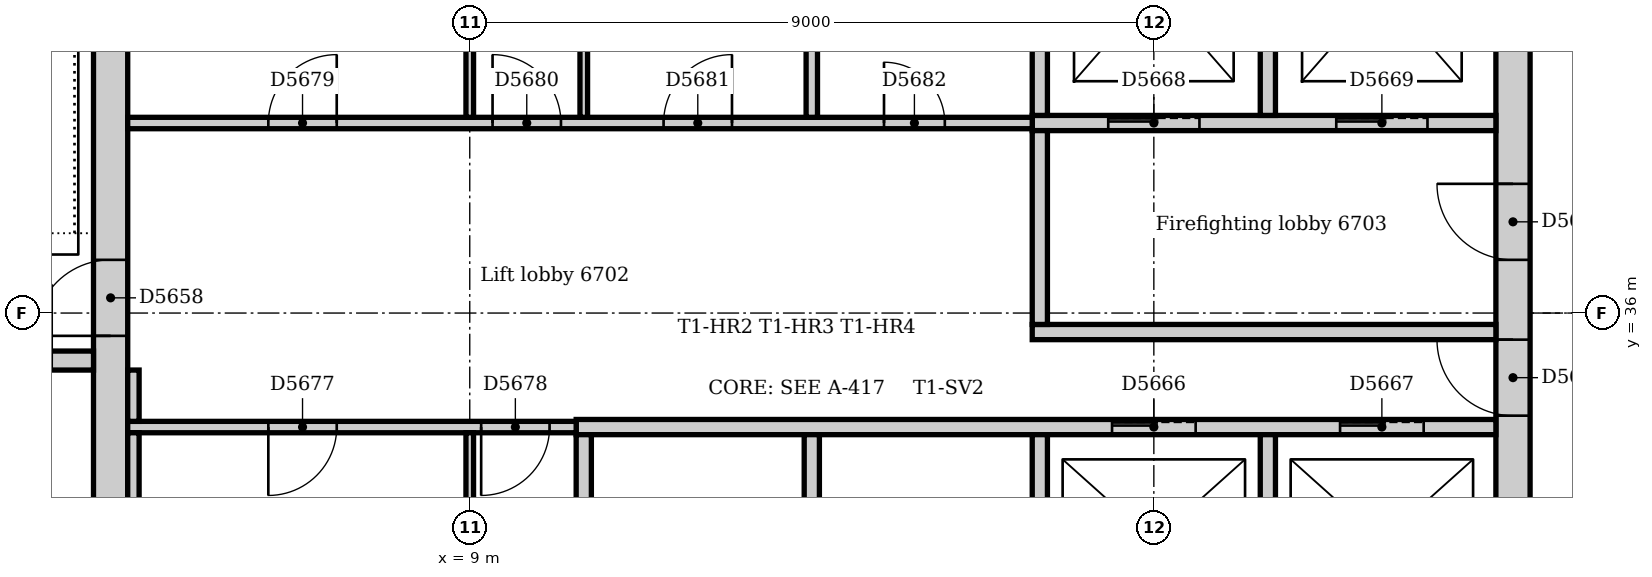
"""IFC4 building model, lengths in metres.
Left out: names, types, materials, properties, quantities, classifications, styles, units other than length and angle.
Written with IfcOpenShell. Run it as: python <this file> out.ifc"""

import sys

from ifc_helpers import new_model, si_unit, direction, frame, frame_2d, origin, place, context, subcontext, project, spatial, rectangle, extrude, element, fill, save


model = new_model("IFC4")
c1 = context("Model", 3, precision=1e-05, world=origin(), true_north=direction((0.0, 1.0)))
c2 = subcontext(c1, "Body", "Model", "MODEL_VIEW")
j1 = project(units=[si_unit("LENGTHUNIT", "METRE"), si_unit("PLANEANGLEUNIT", "RADIAN")], contexts=[c1])
p1 = place(None, origin())
s1 = spatial("IfcSite", under=j1, at=p1, CompositionType="ELEMENT")
p2 = place(p1, origin())
s2 = spatial("IfcBuilding", under=s1, at=p2, CompositionType="ELEMENT")
p3 = place(p2, frame((0.0, 0.0, 279.0)))
s3 = spatial("IfcBuildingStorey", under=s2, at=p3, CompositionType="ELEMENT", Elevation=279.0)
p4 = place(p3, frame((22.725, 31.5, 0.0), z_axis=(0.0, 0.0, 1.0), x_axis=(0.0, 1.0, 0.0)))
e1 = element("IfcWall", 1, at=p4, inside=s3, PredefinedType="SOLIDWALL", context=c2, shape_type="SweptSolid", body=[
    extrude(rectangle(XDim=10.5, YDim=0.45, at=frame_2d((5.25, 0.0))), origin(), (0.0, 0.0, 1.0), 4.0),
])
p5 = place(p4, frame((3.15, 0.0, 0.0)))
e2 = element("IfcOpeningElement", 2, at=p5, cuts=e1, PredefinedType="OPENING", context=c2, shape_type="SweptSolid", body=[
    extrude(rectangle(XDim=1.0, YDim=2.1, at=frame_2d((0.5, 1.05))), frame((0.0, 0.235, 0.0), z_axis=(0.0, -1.0, 0.0), x_axis=(1.0, 0.0, 0.0)), (0.0, 0.0, 1.0), 0.47),
])
p6 = place(p4, frame((5.2, 0.0, 0.0)))
e3 = element("IfcOpeningElement", 3, at=p6, cuts=e1, PredefinedType="OPENING", context=c2, shape_type="SweptSolid", body=[
    extrude(rectangle(XDim=1.0, YDim=2.1, at=frame_2d((0.5, 1.05))), frame((0.0, 0.235, 0.0), z_axis=(0.0, -1.0, 0.0), x_axis=(1.0, 0.0, 0.0)), (0.0, 0.0, 1.0), 0.47),
])
p7 = place(p3, frame((4.275, 42.0, 0.0), z_axis=(0.0, 0.0, 1.0), x_axis=(0.0, -1.0, 0.0)))
e4 = element("IfcWall", 4, at=p7, inside=s3, PredefinedType="SOLIDWALL", context=c2, shape_type="SweptSolid", body=[
    extrude(rectangle(XDim=10.5, YDim=0.45, at=frame_2d((5.25, 0.0))), origin(), (0.0, 0.0, 1.0), 4.0),
])
p8 = place(p7, frame((5.3, 0.0, 0.0)))
e5 = element("IfcOpeningElement", 5, at=p8, cuts=e4, PredefinedType="OPENING", context=c2, shape_type="SweptSolid", body=[
    extrude(rectangle(XDim=1.0, YDim=2.1, at=frame_2d((0.5, 1.05))), frame((0.0, 0.235, 0.0), z_axis=(0.0, -1.0, 0.0), x_axis=(1.0, 0.0, 0.0)), (0.0, 0.0, 1.0), 0.47),
])
p9 = place(p3, frame((0.36, 35.375, 0.0), z_axis=(0.0, 0.0, 1.0), x_axis=(1.0, 0.0, 0.0)))
e6 = element("IfcWall", 6, at=p9, inside=s3, PredefinedType="SOLIDWALL", context=c2, shape_type="SweptSolid", body=[
    extrude(rectangle(XDim=3.69, YDim=0.25, at=frame_2d((1.845, 0.0))), origin(), (0.0, 0.0, 1.0), 4.0),
])
p10 = place(p9, frame((2.14, 0.0, 0.0)))
e7 = element("IfcOpeningElement", 7, at=p10, cuts=e6, PredefinedType="OPENING", context=c2, shape_type="SweptSolid", body=[
    extrude(rectangle(XDim=1.0, YDim=2.1, at=frame_2d((0.5, 1.05))), frame((0.0, 0.135, 0.0), z_axis=(0.0, -1.0, 0.0), x_axis=(1.0, 0.0, 0.0)), (0.0, 0.0, 1.0), 0.27),
])
p11 = place(p3, frame((16.4, 35.75, 0.0), z_axis=(0.0, 0.0, 1.0), x_axis=(1.0, 0.0, 0.0)))
e8 = element("IfcWall", 8, at=p11, inside=s3, PredefinedType="PARTITIONING", context=c2, shape_type="SweptSolid", body=[
    extrude(rectangle(XDim=6.1, YDim=0.2, at=frame_2d((3.05, 0.0))), origin(), (0.0, 0.0, 1.0), 3.8),
])
p12 = place(p3, frame((16.4, 38.5, 0.0), z_axis=(0.0, 0.0, 1.0), x_axis=(1.0, 0.0, 0.0)))
e9 = element("IfcWall", 9, at=p12, inside=s3, PredefinedType="PARTITIONING", context=c2, shape_type="SweptSolid", body=[
    extrude(rectangle(XDim=6.1, YDim=0.2, at=frame_2d((3.05, 0.0))), origin(), (0.0, 0.0, 1.0), 3.8),
])
p13 = place(p12, frame((1.0, 0.0, 0.0)))
e10 = element("IfcOpeningElement", 10, at=p13, cuts=e9, PredefinedType="OPENING", context=c2, shape_type="SweptSolid", body=[
    extrude(rectangle(XDim=1.2, YDim=2.1, at=frame_2d((0.6, 1.05))), frame((0.0, 0.11, 0.0), z_axis=(0.0, -1.0, 0.0), x_axis=(1.0, 0.0, 0.0)), (0.0, 0.0, 1.0), 0.22),
])
p14 = place(p12, frame((4.0, 0.0, 0.0)))
e11 = element("IfcOpeningElement", 11, at=p14, cuts=e9, PredefinedType="OPENING", context=c2, shape_type="SweptSolid", body=[
    extrude(rectangle(XDim=1.2, YDim=2.1, at=frame_2d((0.6, 1.05))), frame((0.0, 0.11, 0.0), z_axis=(0.0, -1.0, 0.0), x_axis=(1.0, 0.0, 0.0)), (0.0, 0.0, 1.0), 0.22),
])
p15 = place(p3, frame((16.5, 35.85, 0.0), z_axis=(0.0, 0.0, 1.0), x_axis=(0.0, 1.0, 0.0)))
e12 = element("IfcWall", 12, at=p15, inside=s3, PredefinedType="PARTITIONING", context=c2, shape_type="SweptSolid", body=[
    extrude(rectangle(XDim=2.55, YDim=0.2, at=frame_2d((1.275, 0.0))), origin(), (0.0, 0.0, 1.0), 3.8),
])
p16 = place(p3, frame((10.4, 34.5, 0.0), z_axis=(0.0, 0.0, 1.0), x_axis=(1.0, 0.0, 0.0)))
e13 = element("IfcWall", 13, at=p16, inside=s3, PredefinedType="PARTITIONING", context=c2, shape_type="SweptSolid", body=[
    extrude(rectangle(XDim=12.1, YDim=0.2, at=frame_2d((6.05, 0.0))), origin(), (0.0, 0.0, 1.0), 3.8),
])
p17 = place(p16, frame((7.05, 0.0, 0.0)))
e14 = element("IfcOpeningElement", 14, at=p17, cuts=e13, PredefinedType="OPENING", context=c2, shape_type="SweptSolid", body=[
    extrude(rectangle(XDim=1.1, YDim=2.1, at=frame_2d((0.55, 1.05))), frame((0.0, 0.11, 0.0), z_axis=(0.0, -1.0, 0.0), x_axis=(1.0, 0.0, 0.0)), (0.0, 0.0, 1.0), 0.22),
])
p18 = place(p16, frame((10.05, 0.0, 0.0)))
e15 = element("IfcOpeningElement", 15, at=p18, cuts=e13, PredefinedType="OPENING", context=c2, shape_type="SweptSolid", body=[
    extrude(rectangle(XDim=1.1, YDim=2.1, at=frame_2d((0.55, 1.05))), frame((0.0, 0.11, 0.0), z_axis=(0.0, -1.0, 0.0), x_axis=(1.0, 0.0, 0.0)), (0.0, 0.0, 1.0), 0.22),
])
for number, where, z_axis, x_axis in (
    (16, (10.5, 31.75, 0.0), (0.0, 0.0, 1.0), (0.0, 1.0, 0.0)),
    (17, (13.5, 31.75, 0.0), (0.0, 0.0, 1.0), (0.0, 1.0, 0.0)),
    (18, (16.5, 31.75, 0.0), (0.0, 0.0, 1.0), (0.0, 1.0, 0.0)),
    (19, (19.5, 31.75, 0.0), (0.0, 0.0, 1.0), (0.0, 1.0, 0.0)),
):
    element("IfcWall", number, at=place(p3, frame(where, z_axis=z_axis, x_axis=x_axis)), inside=s3, PredefinedType="PARTITIONING", context=c2, shape_type="SweptSolid", body=[
        extrude(rectangle(XDim=2.65, YDim=0.2, at=frame_2d((1.325, 0.0))), origin(), (0.0, 0.0, 1.0), 3.8),
    ])
for number, where, z_axis, x_axis in (
    (20, (16.5, 38.6, 0.0), (0.0, 0.0, 1.0), (0.0, 1.0, 0.0)),
    (21, (19.5, 38.6, 0.0), (0.0, 0.0, 1.0), (0.0, 1.0, 0.0)),
):
    element("IfcWall", number, at=place(p3, frame(where, z_axis=z_axis, x_axis=x_axis)), inside=s3, PredefinedType="PARTITIONING", context=c2, shape_type="SweptSolid", body=[
        extrude(rectangle(XDim=3.4, YDim=0.2, at=frame_2d((1.7, 0.0))), origin(), (0.0, 0.0, 1.0), 3.8),
    ])
p19 = place(p3, frame((4.5, 38.5, 0.0), z_axis=(0.0, 0.0, 1.0), x_axis=(1.0, 0.0, 0.0)))
e22 = element("IfcWall", 22, at=p19, inside=s3, PredefinedType="PARTITIONING", context=c2, shape_type="SweptSolid", body=[
    extrude(rectangle(XDim=11.9, YDim=0.15, at=frame_2d((5.95, 0.0))), origin(), (0.0, 0.0, 1.0), 3.8),
])
p20 = place(p19, frame((1.85, 0.0, 0.0)))
e23 = element("IfcOpeningElement", 23, at=p20, cuts=e22, PredefinedType="OPENING", context=c2, shape_type="SweptSolid", body=[
    extrude(rectangle(XDim=0.9, YDim=2.1, at=frame_2d((0.45, 1.05))), frame((0.0, 0.085, 0.0), z_axis=(0.0, -1.0, 0.0), x_axis=(1.0, 0.0, 0.0)), (0.0, 0.0, 1.0), 0.17),
])
p21 = place(p19, frame((4.8, 0.0, 0.0)))
e24 = element("IfcOpeningElement", 24, at=p21, cuts=e22, PredefinedType="OPENING", context=c2, shape_type="SweptSolid", body=[
    extrude(rectangle(XDim=0.9, YDim=2.1, at=frame_2d((0.45, 1.05))), frame((0.0, 0.085, 0.0), z_axis=(0.0, -1.0, 0.0), x_axis=(1.0, 0.0, 0.0)), (0.0, 0.0, 1.0), 0.17),
])
p22 = place(p19, frame((7.05, 0.0, 0.0)))
e25 = element("IfcOpeningElement", 25, at=p22, cuts=e22, PredefinedType="OPENING", context=c2, shape_type="SweptSolid", body=[
    extrude(rectangle(XDim=0.9, YDim=2.1, at=frame_2d((0.45, 1.05))), frame((0.0, 0.085, 0.0), z_axis=(0.0, -1.0, 0.0), x_axis=(1.0, 0.0, 0.0)), (0.0, 0.0, 1.0), 0.17),
])
p23 = place(p19, frame((9.95, 0.0, 0.0)))
e26 = element("IfcOpeningElement", 26, at=p23, cuts=e22, PredefinedType="OPENING", context=c2, shape_type="SweptSolid", body=[
    extrude(rectangle(XDim=0.8, YDim=2.1, at=frame_2d((0.4, 1.05))), frame((0.0, 0.085, 0.0), z_axis=(0.0, -1.0, 0.0), x_axis=(1.0, 0.0, 0.0)), (0.0, 0.0, 1.0), 0.17),
])
p24 = place(p3, frame((4.5, 34.5, 0.0), z_axis=(0.0, 0.0, 1.0), x_axis=(1.0, 0.0, 0.0)))
e27 = element("IfcWall", 27, at=p24, inside=s3, PredefinedType="PARTITIONING", context=c2, shape_type="SweptSolid", body=[
    extrude(rectangle(XDim=5.9, YDim=0.15, at=frame_2d((2.95, 0.0))), origin(), (0.0, 0.0, 1.0), 3.8),
])
p25 = place(p24, frame((1.85, 0.0, 0.0)))
e28 = element("IfcOpeningElement", 28, at=p25, cuts=e27, PredefinedType="OPENING", context=c2, shape_type="SweptSolid", body=[
    extrude(rectangle(XDim=0.9, YDim=2.1, at=frame_2d((0.45, 1.05))), frame((0.0, 0.085, 0.0), z_axis=(0.0, -1.0, 0.0), x_axis=(1.0, 0.0, 0.0)), (0.0, 0.0, 1.0), 0.17),
])
p26 = place(p24, frame((4.65, 0.0, 0.0)))
e29 = element("IfcOpeningElement", 29, at=p26, cuts=e27, PredefinedType="OPENING", context=c2, shape_type="SweptSolid", body=[
    extrude(rectangle(XDim=0.9, YDim=2.1, at=frame_2d((0.45, 1.05))), frame((0.0, 0.085, 0.0), z_axis=(0.0, -1.0, 0.0), x_axis=(1.0, 0.0, 0.0)), (0.0, 0.0, 1.0), 0.17),
])
p27 = place(p3, frame((4.575, 34.575, 0.0), z_axis=(0.0, 0.0, 1.0), x_axis=(0.0, 1.0, 0.0)))
e30 = element("IfcWall", 30, at=p27, inside=s3, PredefinedType="PARTITIONING", context=c2, shape_type="SweptSolid", body=[
    extrude(rectangle(XDim=0.675, YDim=0.15, at=frame_2d((0.338, 0.0))), origin(), (0.0, 0.0, 1.0), 3.8),
])
p28 = place(p3, frame((4.575, 31.75, 0.0), z_axis=(0.0, 0.0, 1.0), x_axis=(0.0, 1.0, 0.0)))
e31 = element("IfcWall", 31, at=p28, inside=s3, PredefinedType="PARTITIONING", context=c2, shape_type="SweptSolid", body=[
    extrude(rectangle(XDim=2.675, YDim=0.15, at=frame_2d((1.337, 0.0))), origin(), (0.0, 0.0, 1.0), 3.8),
])
p29 = place(p3, frame((13.5, 38.575, 0.0), z_axis=(0.0, 0.0, 1.0), x_axis=(0.0, 1.0, 0.0)))
e32 = element("IfcWall", 32, at=p29, inside=s3, PredefinedType="PARTITIONING", context=c2, shape_type="SweptSolid", body=[
    extrude(rectangle(XDim=3.425, YDim=0.15, at=frame_2d((1.712, 0.0))), origin(), (0.0, 0.0, 1.0), 3.8),
])
for number, where, z_axis, x_axis in (
    (33, (9.0, 38.575, 0.0), (0.0, 0.0, 1.0), (0.0, 1.0, 0.0)),
    (34, (10.5, 38.575, 0.0), (0.0, 0.0, 1.0), (0.0, 1.0, 0.0)),
):
    element("IfcWall", number, at=place(p3, frame(where, z_axis=z_axis, x_axis=x_axis)), inside=s3, PredefinedType="PARTITIONING", context=c2, shape_type="SweptSolid", body=[
        extrude(rectangle(XDim=3.425, YDim=0.1, at=frame_2d((1.712, 0.0))), origin(), (0.0, 0.0, 1.0), 3.8),
    ])
p30 = place(p3, frame((9.0, 31.75, 0.0), z_axis=(0.0, 0.0, 1.0), x_axis=(0.0, 1.0, 0.0)))
e35 = element("IfcWall", 35, at=p30, inside=s3, PredefinedType="PARTITIONING", context=c2, shape_type="SweptSolid", body=[
    extrude(rectangle(XDim=2.675, YDim=0.1, at=frame_2d((1.337, 0.0))), origin(), (0.0, 0.0, 1.0), 3.8),
])
p31 = place(p8, frame((1.0, 0.0, 0.0), z_axis=(0.0, 0.0, 1.0), x_axis=(-1.0, 0.0, 0.0)))
e36 = element("IfcDoor", 36, at=p31, inside=s3, OperationType="SINGLE_SWING_LEFT", PredefinedType="DOOR", context=c2, shape_type="SweptSolid", body=[
    extrude(rectangle(XDim=1.0, YDim=2.1, at=frame_2d((0.5, 1.05))), frame((0.0, 0.025, 0.0), z_axis=(0.0, -1.0, 0.0), x_axis=(1.0, 0.0, 0.0)), (0.0, 0.0, 1.0), 0.05),
])
fill(e5, e36)
p32 = place(p17, origin())
e37 = element("IfcDoor", 37, at=p32, inside=s3, OperationType="SLIDING_TO_LEFT", PredefinedType="DOOR", context=c2, shape_type="SweptSolid", body=[
    extrude(rectangle(XDim=1.1, YDim=2.1, at=frame_2d((0.55, 1.05))), frame((0.0, 0.025, 0.0), z_axis=(0.0, -1.0, 0.0), x_axis=(1.0, 0.0, 0.0)), (0.0, 0.0, 1.0), 0.05),
])
fill(e14, e37)
p33 = place(p18, origin())
e38 = element("IfcDoor", 38, at=p33, inside=s3, OperationType="SLIDING_TO_LEFT", PredefinedType="DOOR", context=c2, shape_type="SweptSolid", body=[
    extrude(rectangle(XDim=1.1, YDim=2.1, at=frame_2d((0.55, 1.05))), frame((0.0, 0.025, 0.0), z_axis=(0.0, -1.0, 0.0), x_axis=(1.0, 0.0, 0.0)), (0.0, 0.0, 1.0), 0.05),
])
fill(e15, e38)
p34 = place(p13, origin())
e39 = element("IfcDoor", 39, at=p34, inside=s3, OperationType="SLIDING_TO_LEFT", PredefinedType="DOOR", context=c2, shape_type="SweptSolid", body=[
    extrude(rectangle(XDim=1.2, YDim=2.1, at=frame_2d((0.6, 1.05))), frame((0.0, 0.025, 0.0), z_axis=(0.0, -1.0, 0.0), x_axis=(1.0, 0.0, 0.0)), (0.0, 0.0, 1.0), 0.05),
])
fill(e10, e39)
p35 = place(p14, origin())
e40 = element("IfcDoor", 40, at=p35, inside=s3, OperationType="SLIDING_TO_LEFT", PredefinedType="DOOR", context=c2, shape_type="SweptSolid", body=[
    extrude(rectangle(XDim=1.2, YDim=2.1, at=frame_2d((0.6, 1.05))), frame((0.0, 0.025, 0.0), z_axis=(0.0, -1.0, 0.0), x_axis=(1.0, 0.0, 0.0)), (0.0, 0.0, 1.0), 0.05),
])
fill(e11, e40)
p36 = place(p5, origin())
e41 = element("IfcDoor", 41, at=p36, inside=s3, OperationType="SINGLE_SWING_RIGHT", PredefinedType="DOOR", context=c2, shape_type="SweptSolid", body=[
    extrude(rectangle(XDim=1.0, YDim=2.1, at=frame_2d((0.5, 1.05))), frame((0.0, 0.025, 0.0), z_axis=(0.0, -1.0, 0.0), x_axis=(1.0, 0.0, 0.0)), (0.0, 0.0, 1.0), 0.05),
])
fill(e2, e41)
p37 = place(p6, origin())
e42 = element("IfcDoor", 42, at=p37, inside=s3, OperationType="SINGLE_SWING_RIGHT", PredefinedType="DOOR", context=c2, shape_type="SweptSolid", body=[
    extrude(rectangle(XDim=1.0, YDim=2.1, at=frame_2d((0.5, 1.05))), frame((0.0, 0.025, 0.0), z_axis=(0.0, -1.0, 0.0), x_axis=(1.0, 0.0, 0.0)), (0.0, 0.0, 1.0), 0.05),
])
fill(e3, e42)
p38 = place(p25, frame((0.9, 0.0, 0.0), z_axis=(0.0, 0.0, 1.0), x_axis=(-1.0, 0.0, 0.0)))
e43 = element("IfcDoor", 43, at=p38, inside=s3, OperationType="SINGLE_SWING_RIGHT", PredefinedType="DOOR", context=c2, shape_type="SweptSolid", body=[
    extrude(rectangle(XDim=0.9, YDim=2.1, at=frame_2d((0.45, 1.05))), frame((0.0, 0.025, 0.0), z_axis=(0.0, -1.0, 0.0), x_axis=(1.0, 0.0, 0.0)), (0.0, 0.0, 1.0), 0.05),
])
fill(e28, e43)
p39 = place(p26, frame((0.9, 0.0, 0.0), z_axis=(0.0, 0.0, 1.0), x_axis=(-1.0, 0.0, 0.0)))
e44 = element("IfcDoor", 44, at=p39, inside=s3, OperationType="SINGLE_SWING_RIGHT", PredefinedType="DOOR", context=c2, shape_type="SweptSolid", body=[
    extrude(rectangle(XDim=0.9, YDim=2.1, at=frame_2d((0.45, 1.05))), frame((0.0, 0.025, 0.0), z_axis=(0.0, -1.0, 0.0), x_axis=(1.0, 0.0, 0.0)), (0.0, 0.0, 1.0), 0.05),
])
fill(e29, e44)
p40 = place(p20, origin())
e45 = element("IfcDoor", 45, at=p40, inside=s3, OperationType="SINGLE_SWING_RIGHT", PredefinedType="DOOR", context=c2, shape_type="SweptSolid", body=[
    extrude(rectangle(XDim=0.9, YDim=2.1, at=frame_2d((0.45, 1.05))), frame((0.0, 0.025, 0.0), z_axis=(0.0, -1.0, 0.0), x_axis=(1.0, 0.0, 0.0)), (0.0, 0.0, 1.0), 0.05),
])
fill(e23, e45)
p41 = place(p21, origin())
e46 = element("IfcDoor", 46, at=p41, inside=s3, OperationType="SINGLE_SWING_LEFT", PredefinedType="DOOR", context=c2, shape_type="SweptSolid", body=[
    extrude(rectangle(XDim=0.9, YDim=2.1, at=frame_2d((0.45, 1.05))), frame((0.0, 0.025, 0.0), z_axis=(0.0, -1.0, 0.0), x_axis=(1.0, 0.0, 0.0)), (0.0, 0.0, 1.0), 0.05),
])
fill(e24, e46)
p42 = place(p22, origin())
e47 = element("IfcDoor", 47, at=p42, inside=s3, OperationType="SINGLE_SWING_RIGHT", PredefinedType="DOOR", context=c2, shape_type="SweptSolid", body=[
    extrude(rectangle(XDim=0.9, YDim=2.1, at=frame_2d((0.45, 1.05))), frame((0.0, 0.025, 0.0), z_axis=(0.0, -1.0, 0.0), x_axis=(1.0, 0.0, 0.0)), (0.0, 0.0, 1.0), 0.05),
])
fill(e25, e47)
p43 = place(p23, origin())
e48 = element("IfcDoor", 48, at=p43, inside=s3, OperationType="SINGLE_SWING_LEFT", PredefinedType="DOOR", context=c2, shape_type="SweptSolid", body=[
    extrude(rectangle(XDim=0.8, YDim=2.1, at=frame_2d((0.4, 1.05))), frame((0.0, 0.025, 0.0), z_axis=(0.0, -1.0, 0.0), x_axis=(1.0, 0.0, 0.0)), (0.0, 0.0, 1.0), 0.05),
])
fill(e26, e48)
save(model, sys.argv[1])
